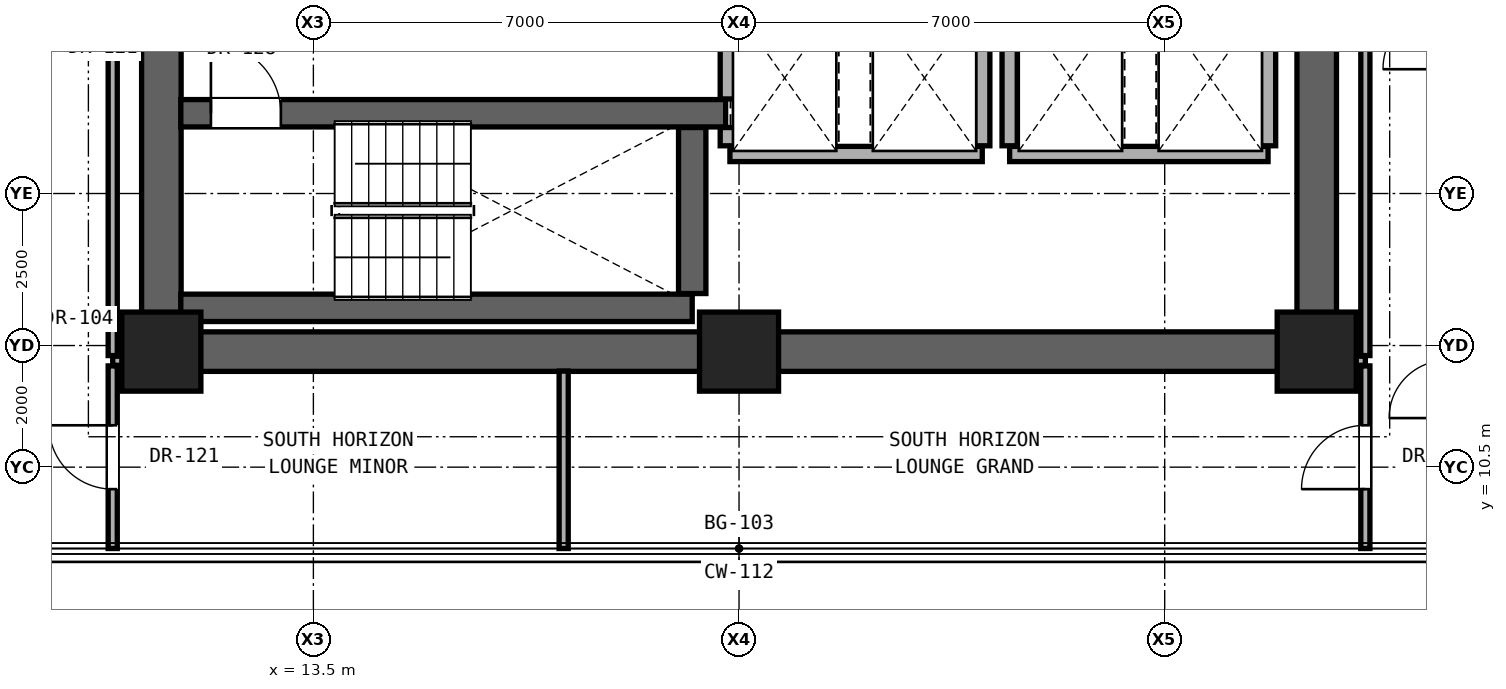
"""IFC4 building model, lengths in metres.
Left out: names, types, materials, properties, quantities, classifications, styles, units other than length and angle.
Written with IfcOpenShell. Run it as: python <this file> out.ifc"""

import sys

from ifc_helpers import new_model, si_unit, direction, frame, frame_2d, origin, origin_2d, place, context, subcontext, project, spatial, rectangle, extrude, element, fill, save


model = new_model("IFC4")
c1 = context("Model", 3, precision=1e-05, world=origin(), true_north=direction((0.0, 1.0)))
c2 = subcontext(c1, "Body", "Model", "MODEL_VIEW")
j1 = project(units=[si_unit("LENGTHUNIT", "METRE"), si_unit("PLANEANGLEUNIT", "RADIAN")], contexts=[c1])
p1 = place(None, origin())
s1 = spatial("IfcSite", under=j1, at=p1, CompositionType="ELEMENT")
p2 = place(p1, origin())
s2 = spatial("IfcBuilding", under=s1, at=p2, CompositionType="ELEMENT")
p3 = place(p2, frame((0.0, 0.0, 55.4)))
s3 = spatial("IfcBuildingStorey", under=s2, at=p3, CompositionType="ELEMENT", Elevation=55.4)
for number, where, z_axis, x_axis in (
    (1, (11.0, 12.4, 0.0), (0.0, 0.0, 1.0), (1.0, 0.0, 0.0)),
    (2, (20.5, 12.4, 0.0), (0.0, 0.0, 1.0), (1.0, 0.0, 0.0)),
    (3, (30.0, 12.4, 0.0), (0.0, 0.0, 1.0), (1.0, 0.0, 0.0)),
):
    element("IfcColumn", number, at=place(p3, frame(where, z_axis=z_axis, x_axis=x_axis)), inside=s3, PredefinedType="COLUMN", context=c2, shape_type="SweptSolid", body=[
        extrude(rectangle(XDim=1.3, YDim=1.3, at=origin_2d()), origin(), (0.0, 0.0, 1.0), 3.3),
    ])
p4 = place(p3, frame((11.0, 12.4, 0.0), z_axis=(0.0, 0.0, 1.0), x_axis=(1.0, 0.0, 0.0)))
e4 = element("IfcWall", 4, at=p4, inside=s3, PredefinedType="SHEAR", context=c2, shape_type="SweptSolid", body=[
    extrude(rectangle(XDim=19.0, YDim=0.65, at=frame_2d((9.5, 0.0))), origin(), (0.0, 0.0, 1.0), 3.06),
])
for number, where, z_axis, x_axis in (
    (5, (11.0, 12.4, 0.0), (0.0, 0.0, 1.0), (0.0, 1.0, 0.0)),
    (6, (30.0, 12.4, 0.0), (0.0, 0.0, 1.0), (0.0, 1.0, 0.0)),
):
    element("IfcWall", number, at=place(p3, frame(where, z_axis=z_axis, x_axis=x_axis)), inside=s3, PredefinedType="SHEAR", context=c2, shape_type="SweptSolid", body=[
        extrude(rectangle(XDim=6.0, YDim=0.65, at=frame_2d((3.0, 0.0))), origin(), (0.0, 0.0, 1.0), 3.06),
    ])
for number, where, z_axis, x_axis in (
    (7, (10.2, 12.25, 0.0), (0.0, 0.0, 1.0), (1.0, 0.0, 0.0)),
    (8, (30.32, 12.25, 0.0), (0.0, 0.0, 1.0), (1.0, 0.0, 0.0)),
):
    element("IfcWall", number, at=place(p3, frame(where, z_axis=z_axis, x_axis=x_axis)), inside=s3, PredefinedType="PARTITIONING", context=c2, shape_type="SweptSolid", body=[
        extrude(rectangle(XDim=0.48, YDim=0.15, at=frame_2d((0.24, 0.0))), origin(), (0.0, 0.0, 1.0), 3.06),
    ])
p5 = place(p3, frame((11.32, 13.12, 0.0), z_axis=(0.0, 0.0, 1.0), x_axis=(1.0, 0.0, 0.0)))
e9 = element("IfcWall", 9, at=p5, inside=s3, PredefinedType="SHEAR", context=c2, shape_type="SweptSolid", body=[
    extrude(rectangle(XDim=8.41, YDim=0.45, at=frame_2d((4.205, 0.0))), origin(), (0.0, 0.0, 1.0), 3.06),
])
p6 = place(p3, frame((20.35, 15.65, 0.0), z_axis=(0.0, 0.0, 1.0), x_axis=(1.0, 0.0, 0.0)))
e10 = element("IfcWall", 10, at=p6, inside=s3, PredefinedType="SOLIDWALL", context=c2, shape_type="SweptSolid", body=[
    extrude(rectangle(XDim=4.15, YDim=0.25, at=frame_2d((2.075, 0.0))), origin(), (0.0, 0.0, 1.0), 3.06),
])
p7 = place(p3, frame((24.95, 15.65, 0.0), z_axis=(0.0, 0.0, 1.0), x_axis=(1.0, 0.0, 0.0)))
e11 = element("IfcWall", 11, at=p7, inside=s3, PredefinedType="SOLIDWALL", context=c2, shape_type="SweptSolid", body=[
    extrude(rectangle(XDim=4.25, YDim=0.25, at=frame_2d((2.125, 0.0))), origin(), (0.0, 0.0, 1.0), 3.06),
])
p8 = place(p3, frame((11.32, 16.32, 0.0), z_axis=(0.0, 0.0, 1.0), x_axis=(1.0, 0.0, 0.0)))
e12 = element("IfcWall", 12, at=p8, inside=s3, PredefinedType="SHEAR", context=c2, shape_type="SweptSolid", body=[
    extrude(rectangle(XDim=8.96, YDim=0.45, at=frame_2d((4.48, 0.0))), origin(), (0.0, 0.0, 1.0), 3.06),
])
p9 = place(p8, frame((0.495, 0.0, 0.0)))
e13 = element("IfcOpeningElement", 13, at=p9, cuts=e12, PredefinedType="OPENING", context=c2, shape_type="SweptSolid", body=[
    extrude(rectangle(XDim=1.15, YDim=2.2, at=frame_2d((0.575, 1.1))), frame((0.0, 0.235, 0.0), z_axis=(0.0, -1.0, 0.0), x_axis=(1.0, 0.0, 0.0)), (0.0, 0.0, 1.0), 0.47),
])
p10 = place(p3, frame((10.2, 9.162, 0.0), z_axis=(0.0, 0.0, 1.0), x_axis=(0.0, 1.0, 0.0)))
e14 = element("IfcWall", 14, at=p10, inside=s3, PredefinedType="PARTITIONING", context=c2, shape_type="SweptSolid", body=[
    extrude(rectangle(XDim=3.003, YDim=0.15, at=frame_2d((1.501, 0.0))), origin(), (0.0, 0.0, 1.0), 3.06),
])
p11 = place(p10, frame((0.977, 0.0, 0.0)))
e15 = element("IfcOpeningElement", 15, at=p11, cuts=e14, PredefinedType="OPENING", context=c2, shape_type="SweptSolid", body=[
    extrude(rectangle(XDim=1.05, YDim=2.2, at=frame_2d((0.525, 1.1))), frame((0.0, 0.085, 0.0), z_axis=(0.0, -1.0, 0.0), x_axis=(1.0, 0.0, 0.0)), (0.0, 0.0, 1.0), 0.17),
])
p12 = place(p3, frame((10.2, 12.335, 0.0), z_axis=(0.0, 0.0, 1.0), x_axis=(0.0, 1.0, 0.0)))
e16 = element("IfcWall", 16, at=p12, inside=s3, PredefinedType="PARTITIONING", context=c2, shape_type="SweptSolid", body=[
    extrude(rectangle(XDim=5.98, YDim=0.15, at=frame_2d((2.99, 0.0))), origin(), (0.0, 0.0, 1.0), 2.436),
])
p13 = place(p3, frame((17.616, 9.162, 0.0), z_axis=(0.0, 0.0, 1.0), x_axis=(0.0, 1.0, 0.0)))
e17 = element("IfcWall", 17, at=p13, inside=s3, PredefinedType="PARTITIONING", context=c2, shape_type="SweptSolid", body=[
    extrude(rectangle(XDim=2.918, YDim=0.15, at=frame_2d((1.459, 0.0))), origin(), (0.0, 0.0, 1.0), 3.06),
])
p14 = place(p3, frame((19.73, 13.355, 0.0), z_axis=(0.0, 0.0, 1.0), x_axis=(0.0, 1.0, 0.0)))
e18 = element("IfcWall", 18, at=p14, inside=s3, PredefinedType="SHEAR", context=c2, shape_type="SweptSolid", body=[
    extrude(rectangle(XDim=2.73, YDim=0.45, at=frame_2d((1.365, 0.0))), origin(), (0.0, 0.0, 1.0), 3.06),
])
p15 = place(p3, frame((20.315, 15.785, 0.0), z_axis=(0.0, 0.0, 1.0), x_axis=(0.0, 1.0, 0.0)))
e19 = element("IfcWall", 19, at=p15, inside=s3, PredefinedType="SOLIDWALL", context=c2, shape_type="SweptSolid", body=[
    extrude(rectangle(XDim=0.3, YDim=0.25, at=frame_2d((0.15, 0.0))), origin(), (0.0, 0.0, 1.0), 3.06),
])
p16 = place(p3, frame((20.315, 16.555, 0.0), z_axis=(0.0, 0.0, 1.0), x_axis=(0.0, 1.0, 0.0)))
e20 = element("IfcWall", 20, at=p16, inside=s3, PredefinedType="SOLIDWALL", context=c2, shape_type="SweptSolid", body=[
    extrude(rectangle(XDim=1.525, YDim=0.25, at=frame_2d((0.763, 0.0))), origin(), (0.0, 0.0, 1.0), 3.06),
])
for number, where, z_axis, x_axis in (
    (21, (24.5, 15.785, 0.0), (0.0, 0.0, 1.0), (0.0, 1.0, 0.0)),
    (22, (24.95, 15.785, 0.0), (0.0, 0.0, 1.0), (0.0, 1.0, 0.0)),
    (23, (29.2, 15.785, 0.0), (0.0, 0.0, 1.0), (0.0, 1.0, 0.0)),
):
    element("IfcWall", number, at=place(p3, frame(where, z_axis=z_axis, x_axis=x_axis)), inside=s3, PredefinedType="SOLIDWALL", context=c2, shape_type="SweptSolid", body=[
        extrude(rectangle(XDim=2.295, YDim=0.25, at=frame_2d((1.147, 0.0))), origin(), (0.0, 0.0, 1.0), 3.06),
    ])
p17 = place(p3, frame((30.8, 9.162, 0.0), z_axis=(0.0, 0.0, 1.0), x_axis=(0.0, 1.0, 0.0)))
e24 = element("IfcWall", 24, at=p17, inside=s3, PredefinedType="PARTITIONING", context=c2, shape_type="SweptSolid", body=[
    extrude(rectangle(XDim=3.003, YDim=0.15, at=frame_2d((1.501, 0.0))), origin(), (0.0, 0.0, 1.0), 3.06),
])
p18 = place(p17, frame((0.977, 0.0, 0.0)))
e25 = element("IfcOpeningElement", 25, at=p18, cuts=e24, PredefinedType="OPENING", context=c2, shape_type="SweptSolid", body=[
    extrude(rectangle(XDim=1.05, YDim=2.2, at=frame_2d((0.525, 1.1))), frame((0.0, 0.085, 0.0), z_axis=(0.0, -1.0, 0.0), x_axis=(1.0, 0.0, 0.0)), (0.0, 0.0, 1.0), 0.17),
])
p19 = place(p3, frame((30.8, 12.335, 0.0), z_axis=(0.0, 0.0, 1.0), x_axis=(0.0, 1.0, 0.0)))
e26 = element("IfcWall", 26, at=p19, inside=s3, PredefinedType="PARTITIONING", context=c2, shape_type="SweptSolid", body=[
    extrude(rectangle(XDim=5.98, YDim=0.15, at=frame_2d((2.99, 0.0))), origin(), (0.0, 0.0, 1.0), 2.436),
])
p20 = place(p9, origin())
e27 = element("IfcDoor", 27, at=p20, inside=s3, OperationType="SINGLE_SWING_LEFT", PredefinedType="DOOR", context=c2, shape_type="SweptSolid", body=[
    extrude(rectangle(XDim=1.15, YDim=2.2, at=frame_2d((0.575, 1.1))), frame((0.0, 0.025, 0.0), z_axis=(0.0, -1.0, 0.0), x_axis=(1.0, 0.0, 0.0)), (0.0, 0.0, 1.0), 0.05),
])
fill(e13, e27)
p21 = place(p11, origin())
e28 = element("IfcDoor", 28, at=p21, inside=s3, OperationType="SINGLE_SWING_RIGHT", PredefinedType="DOOR", context=c2, shape_type="SweptSolid", body=[
    extrude(rectangle(XDim=1.05, YDim=2.2, at=frame_2d((0.525, 1.1))), frame((0.0, 0.025, 0.0), z_axis=(0.0, -1.0, 0.0), x_axis=(1.0, 0.0, 0.0)), (0.0, 0.0, 1.0), 0.05),
])
fill(e15, e28)
p22 = place(p18, origin())
e29 = element("IfcDoor", 29, at=p22, inside=s3, OperationType="SINGLE_SWING_LEFT", PredefinedType="DOOR", context=c2, shape_type="SweptSolid", body=[
    extrude(rectangle(XDim=1.05, YDim=2.2, at=frame_2d((0.525, 1.1))), frame((0.0, 0.025, 0.0), z_axis=(0.0, -1.0, 0.0), x_axis=(1.0, 0.0, 0.0)), (0.0, 0.0, 1.0), 0.05),
])
fill(e25, e29)
save(model, sys.argv[1])
